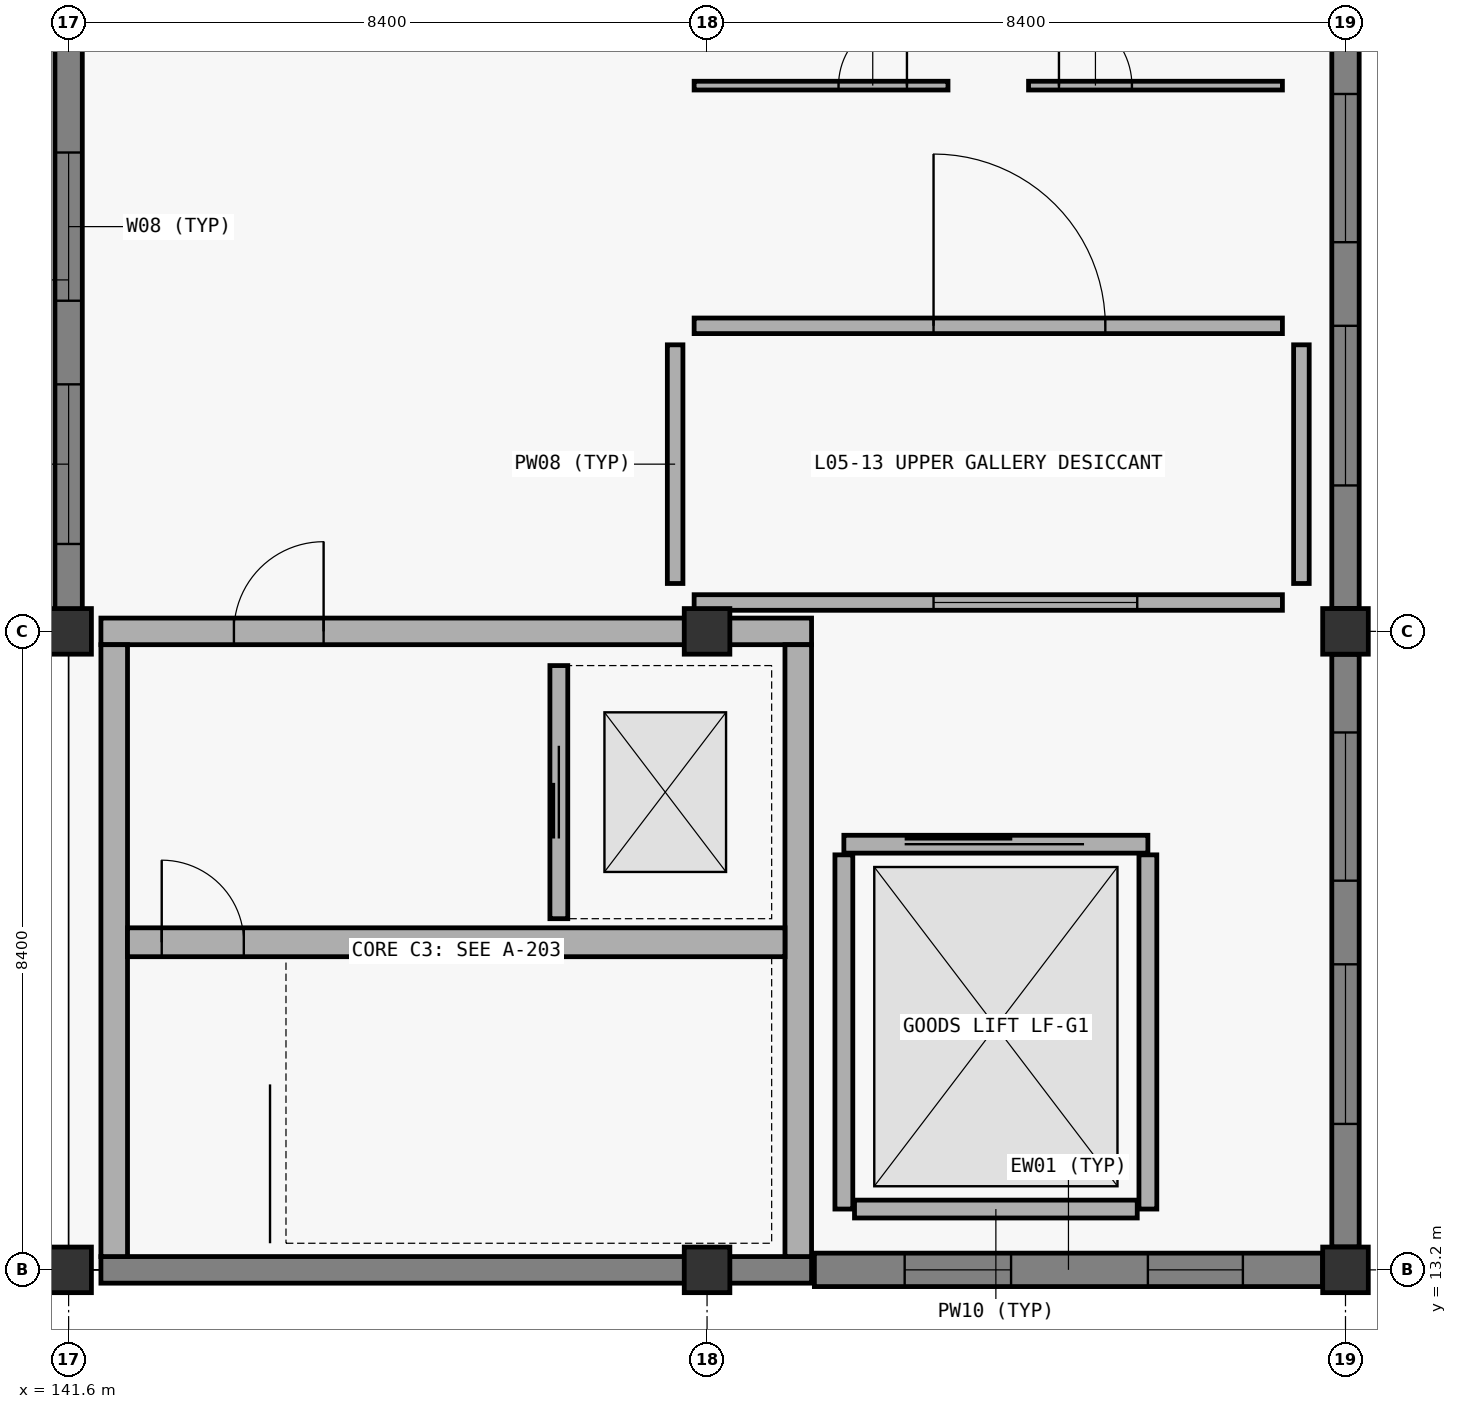
"""IFC4 building model, lengths in metres.
Left out: names, types, materials, properties, quantities, classifications, styles, units other than length and angle.
Written with IfcOpenShell. Run it as: python <this file> out.ifc"""

import sys

from ifc_helpers import new_model, si_unit, direction, frame, frame_2d, origin, origin_2d, place, context, subcontext, project, spatial, rectangle, extrude, element, fill, save


model = new_model("IFC4")
c1 = context("Model", 3, precision=1e-05, world=origin(), true_north=direction((0.0, 1.0)))
c2 = subcontext(c1, "Body", "Model", "MODEL_VIEW")
j1 = project(units=[si_unit("LENGTHUNIT", "METRE"), si_unit("PLANEANGLEUNIT", "RADIAN")], contexts=[c1])
p1 = place(None, origin())
s1 = spatial("IfcSite", under=j1, at=p1, CompositionType="ELEMENT")
p2 = place(p1, origin())
s2 = spatial("IfcBuilding", under=s1, at=p2, CompositionType="ELEMENT")
p3 = place(p2, frame((0.0, 0.0, 26.4)))
s3 = spatial("IfcBuildingStorey", under=s2, at=p3, CompositionType="ELEMENT", Elevation=26.4)
for number, where, z_axis, x_axis in (
    (1, (141.6, 13.2, 0.0), (0.0, 0.0, 1.0), (1.0, 0.0, 0.0)),
    (2, (141.6, 21.6, 0.0), (0.0, 0.0, 1.0), (1.0, 0.0, 0.0)),
    (3, (150.0, 13.2, 0.0), (0.0, 0.0, 1.0), (1.0, 0.0, 0.0)),
    (4, (150.0, 21.6, 0.0), (0.0, 0.0, 1.0), (1.0, 0.0, 0.0)),
    (5, (158.4, 13.2, 0.0), (0.0, 0.0, 1.0), (1.0, 0.0, 0.0)),
    (6, (158.4, 21.6, 0.0), (0.0, 0.0, 1.0), (1.0, 0.0, 0.0)),
):
    element("IfcColumn", number, at=place(p3, frame(where, z_axis=z_axis, x_axis=x_axis)), inside=s3, PredefinedType="COLUMN", context=c2, shape_type="SweptSolid", body=[
        extrude(rectangle(XDim=0.6, YDim=0.6, at=origin_2d()), origin(), (0.0, 0.0, 1.0), 4.5),
    ])
p4 = place(p3, frame((151.375, 13.2, 0.0), z_axis=(0.0, 0.0, 1.0), x_axis=(-1.0, 0.0, 0.0)))
e7 = element("IfcWall", 7, at=p4, inside=s3, PredefinedType="SHEAR", context=c2, shape_type="SweptSolid", body=[
    extrude(rectangle(XDim=9.35, YDim=0.35, at=frame_2d((4.675, 0.0))), origin(), (0.0, 0.0, 1.0), 4.5),
])
p5 = place(p3, frame((142.025, 21.6, 0.0), z_axis=(0.0, 0.0, 1.0), x_axis=(1.0, 0.0, 0.0)))
e8 = element("IfcWall", 8, at=p5, inside=s3, PredefinedType="SHEAR", context=c2, shape_type="SweptSolid", body=[
    extrude(rectangle(XDim=9.35, YDim=0.35, at=frame_2d((4.675, 0.0))), origin(), (0.0, 0.0, 1.0), 4.5),
])
p6 = place(p5, frame((1.75, 0.0, 0.0)))
e9 = element("IfcOpeningElement", 9, at=p6, cuts=e8, PredefinedType="OPENING", context=c2, shape_type="SweptSolid", body=[
    extrude(rectangle(XDim=1.18, YDim=2.24, at=frame_2d((0.59, 1.12))), frame((0.0, 0.185, 0.0), z_axis=(0.0, -1.0, 0.0), x_axis=(1.0, 0.0, 0.0)), (0.0, 0.0, 1.0), 0.37),
])
for number, where, z_axis, x_axis in (
    (10, (142.2, 13.375, 0.0), (0.0, 0.0, 1.0), (0.0, 1.0, 0.0)),
    (11, (151.2, 13.375, 0.0), (0.0, 0.0, 1.0), (0.0, 1.0, 0.0)),
):
    element("IfcWall", number, at=place(p3, frame(where, z_axis=z_axis, x_axis=x_axis)), inside=s3, PredefinedType="SHEAR", context=c2, shape_type="SweptSolid", body=[
        extrude(rectangle(XDim=8.05, YDim=0.35, at=frame_2d((4.025, 0.0))), origin(), (0.0, 0.0, 1.0), 4.5),
    ])
p7 = place(p3, frame((142.375, 17.51, 0.0), z_axis=(0.0, 0.0, 1.0), x_axis=(1.0, 0.0, 0.0)))
e12 = element("IfcWall", 12, at=p7, inside=s3, PredefinedType="SHEAR", context=c2, shape_type="SweptSolid", body=[
    extrude(rectangle(XDim=8.65, YDim=0.38, at=frame_2d((4.325, 0.0))), origin(), (0.0, 0.0, 1.0), 4.5),
])
p8 = place(p7, frame((0.45, 0.0, 0.0)))
e13 = element("IfcOpeningElement", 13, at=p8, cuts=e12, PredefinedType="OPENING", context=c2, shape_type="SweptSolid", body=[
    extrude(rectangle(XDim=1.08, YDim=2.18, at=frame_2d((0.54, 1.09))), frame((0.0, 0.2, 0.0), z_axis=(0.0, -1.0, 0.0), x_axis=(1.0, 0.0, 0.0)), (0.0, 0.0, 1.0), 0.4),
])
p9 = place(p3, frame((151.412, 13.2, 0.0), z_axis=(0.0, 0.0, 1.0), x_axis=(1.0, 0.0, 0.0)))
e14 = element("IfcWall", 14, at=p9, inside=s3, PredefinedType="SOLIDWALL", context=c2, shape_type="SweptSolid", body=[
    extrude(rectangle(XDim=6.686, YDim=0.44, at=frame_2d((3.343, 0.0))), origin(), (0.0, 0.0, 1.0), 3.58),
])
p10 = place(p9, frame((1.188, 0.0, 0.9)))
e15 = element("IfcOpeningElement", 15, at=p10, cuts=e14, PredefinedType="OPENING", context=c2, shape_type="SweptSolid", body=[
    extrude(rectangle(XDim=1.4, YDim=2.2, at=frame_2d((0.7, 1.1))), frame((0.0, 0.23, 0.0), z_axis=(0.0, -1.0, 0.0), x_axis=(1.0, 0.0, 0.0)), (0.0, 0.0, 1.0), 0.46),
])
p11 = place(p9, frame((4.388, 0.0, 0.9)))
e16 = element("IfcOpeningElement", 16, at=p11, cuts=e14, PredefinedType="OPENING", context=c2, shape_type="SweptSolid", body=[
    extrude(rectangle(XDim=1.25, YDim=2.05, at=frame_2d((0.625, 1.025))), frame((0.0, 0.23, 0.0), z_axis=(0.0, -1.0, 0.0), x_axis=(1.0, 0.0, 0.0)), (0.0, 0.0, 1.0), 0.46),
])
p12 = place(p3, frame((158.4, 13.502, 0.0), z_axis=(0.0, 0.0, 1.0), x_axis=(0.0, 1.0, 0.0)))
e17 = element("IfcWall", 17, at=p12, inside=s3, PredefinedType="SOLIDWALL", context=c2, shape_type="SweptSolid", body=[
    extrude(rectangle(XDim=7.796, YDim=0.36, at=frame_2d((3.898, 0.0))), origin(), (0.0, 0.0, 1.0), 3.58),
])
p13 = place(p12, frame((1.618, 0.0, 0.85)))
e18 = element("IfcOpeningElement", 18, at=p13, cuts=e17, PredefinedType="OPENING", context=c2, shape_type="SweptSolid", body=[
    extrude(rectangle(XDim=2.1, YDim=2.4, at=frame_2d((1.05, 1.2))), frame((0.0, 0.19, 0.0), z_axis=(0.0, -1.0, 0.0), x_axis=(1.0, 0.0, 0.0)), (0.0, 0.0, 1.0), 0.38),
])
p14 = place(p12, frame((4.818, 0.0, 0.85)))
e19 = element("IfcOpeningElement", 19, at=p14, cuts=e17, PredefinedType="OPENING", context=c2, shape_type="SweptSolid", body=[
    extrude(rectangle(XDim=1.95, YDim=2.3, at=frame_2d((0.975, 1.15))), frame((0.0, 0.19, 0.0), z_axis=(0.0, -1.0, 0.0), x_axis=(1.0, 0.0, 0.0)), (0.0, 0.0, 1.0), 0.38),
])
p15 = place(p3, frame((158.4, 21.902, 0.0), z_axis=(0.0, 0.0, 1.0), x_axis=(0.0, 1.0, 0.0)))
e20 = element("IfcWall", 20, at=p15, inside=s3, PredefinedType="SOLIDWALL", context=c2, shape_type="SweptSolid", body=[
    extrude(rectangle(XDim=8.996, YDim=0.36, at=frame_2d((4.498, 0.0))), origin(), (0.0, 0.0, 1.0), 3.74),
])
p16 = place(p15, frame((1.618, 0.0, 0.85)))
e21 = element("IfcOpeningElement", 21, at=p16, cuts=e20, PredefinedType="OPENING", context=c2, shape_type="SweptSolid", body=[
    extrude(rectangle(XDim=2.1, YDim=2.4, at=frame_2d((1.05, 1.2))), frame((0.0, 0.19, 0.0), z_axis=(0.0, -1.0, 0.0), x_axis=(1.0, 0.0, 0.0)), (0.0, 0.0, 1.0), 0.38),
])
p17 = place(p15, frame((4.818, 0.0, 0.85)))
e22 = element("IfcOpeningElement", 22, at=p17, cuts=e20, PredefinedType="OPENING", context=c2, shape_type="SweptSolid", body=[
    extrude(rectangle(XDim=1.95, YDim=2.3, at=frame_2d((0.975, 1.15))), frame((0.0, 0.19, 0.0), z_axis=(0.0, -1.0, 0.0), x_axis=(1.0, 0.0, 0.0)), (0.0, 0.0, 1.0), 0.38),
])
p18 = place(p3, frame((141.6, 21.55, 0.0), z_axis=(0.0, 0.0, 1.0), x_axis=(0.0, 1.0, 0.0)))
e23 = element("IfcWall", 23, at=p18, inside=s3, PredefinedType="SOLIDWALL", context=c2, shape_type="SweptSolid", body=[
    extrude(rectangle(XDim=9.348, YDim=0.36, at=frame_2d((4.674, 0.0))), origin(), (0.0, 0.0, 1.0), 3.74),
])
p19 = place(p18, frame((1.2, 0.0, 0.85)))
e24 = element("IfcOpeningElement", 24, at=p19, cuts=e23, PredefinedType="OPENING", context=c2, shape_type="SweptSolid", body=[
    extrude(rectangle(XDim=2.1, YDim=2.4, at=frame_2d((1.05, 1.2))), frame((0.0, 0.19, 0.0), z_axis=(0.0, -1.0, 0.0), x_axis=(1.0, 0.0, 0.0)), (0.0, 0.0, 1.0), 0.38),
])
p20 = place(p18, frame((4.4, 0.0, 0.85)))
e25 = element("IfcOpeningElement", 25, at=p20, cuts=e23, PredefinedType="OPENING", context=c2, shape_type="SweptSolid", body=[
    extrude(rectangle(XDim=1.95, YDim=2.3, at=frame_2d((0.975, 1.15))), frame((0.0, 0.19, 0.0), z_axis=(0.0, -1.0, 0.0), x_axis=(1.0, 0.0, 0.0)), (0.0, 0.0, 1.0), 0.38),
])
p21 = place(p3, frame((148.05, 17.82, 0.0), z_axis=(0.0, 0.0, 1.0), x_axis=(0.0, 1.0, 0.0)))
e26 = element("IfcWall", 26, at=p21, inside=s3, PredefinedType="PARTITIONING", context=c2, shape_type="SweptSolid", body=[
    extrude(rectangle(XDim=3.33, YDim=0.235, at=frame_2d((1.665, 0.0))), origin(), (0.0, 0.0, 1.0), 4.2),
])
p22 = place(p21, frame((1.055, 0.0, 0.0)))
e27 = element("IfcOpeningElement", 27, at=p22, cuts=e26, PredefinedType="OPENING", context=c2, shape_type="SweptSolid", body=[
    extrude(rectangle(XDim=1.22, YDim=2.24, at=frame_2d((0.61, 1.12))), frame((0.0, 0.127, 0.0), z_axis=(0.0, -1.0, 0.0), x_axis=(1.0, 0.0, 0.0)), (0.0, 0.0, 1.0), 0.255),
])
p23 = place(p3, frame((151.8, 18.8, 0.0), z_axis=(0.0, 0.0, 1.0), x_axis=(1.0, 0.0, 0.0)))
e28 = element("IfcWall", 28, at=p23, inside=s3, PredefinedType="PARTITIONING", context=c2, shape_type="SweptSolid", body=[
    extrude(rectangle(XDim=4.0, YDim=0.235, at=frame_2d((2.0, 0.0))), origin(), (0.0, 0.0, 1.0), 3.91),
])
p24 = place(p23, frame((0.8, 0.0, 0.0)))
e29 = element("IfcOpeningElement", 29, at=p24, cuts=e28, PredefinedType="OPENING", context=c2, shape_type="SweptSolid", body=[
    extrude(rectangle(XDim=2.36, YDim=2.78, at=frame_2d((1.18, 1.39))), frame((0.0, 0.127, 0.0), z_axis=(0.0, -1.0, 0.0), x_axis=(1.0, 0.0, 0.0)), (0.0, 0.0, 1.0), 0.255),
])
p25 = place(p3, frame((151.8, 14.0, 0.0), z_axis=(0.0, 0.0, 1.0), x_axis=(0.0, 1.0, 0.0)))
e30 = element("IfcWall", 30, at=p25, inside=s3, PredefinedType="PARTITIONING", context=c2, shape_type="SweptSolid", body=[
    extrude(rectangle(XDim=4.66, YDim=0.235, at=frame_2d((2.33, 0.0))), origin(), (0.0, 0.0, 1.0), 4.2),
])
p26 = place(p3, frame((155.8, 14.0, 0.0), z_axis=(0.0, 0.0, 1.0), x_axis=(0.0, 1.0, 0.0)))
e31 = element("IfcWall", 31, at=p26, inside=s3, PredefinedType="PARTITIONING", context=c2, shape_type="SweptSolid", body=[
    extrude(rectangle(XDim=4.66, YDim=0.235, at=frame_2d((2.33, 0.0))), origin(), (0.0, 0.0, 1.0), 3.91),
])
p27 = place(p3, frame((151.94, 14.0, 0.0), z_axis=(0.0, 0.0, 1.0), x_axis=(1.0, 0.0, 0.0)))
e32 = element("IfcWall", 32, at=p27, inside=s3, PredefinedType="PARTITIONING", context=c2, shape_type="SweptSolid", body=[
    extrude(rectangle(XDim=3.72, YDim=0.235, at=frame_2d((1.86, 0.0))), origin(), (0.0, 0.0, 1.0), 3.91),
])
p28 = place(p3, frame((149.83, 25.62, 0.0), z_axis=(0.0, 0.0, 1.0), x_axis=(1.0, 0.0, 0.0)))
e33 = element("IfcWall", 33, at=p28, inside=s3, PredefinedType="PARTITIONING", context=c2, shape_type="SweptSolid", body=[
    extrude(rectangle(XDim=7.74, YDim=0.205, at=frame_2d((3.87, 0.0))), origin(), (0.0, 0.0, 1.0), 3.73),
])
p29 = place(p28, frame((3.15, 0.0, 0.0)))
e34 = element("IfcOpeningElement", 34, at=p29, cuts=e33, PredefinedType="OPENING", context=c2, shape_type="SweptSolid", body=[
    extrude(rectangle(XDim=2.26, YDim=2.68, at=frame_2d((1.13, 1.34))), frame((0.0, 0.113, 0.0), z_axis=(0.0, -1.0, 0.0), x_axis=(1.0, 0.0, 0.0)), (0.0, 0.0, 1.0), 0.225),
])
p30 = place(p3, frame((149.83, 21.98, 0.0), z_axis=(0.0, 0.0, 1.0), x_axis=(1.0, 0.0, 0.0)))
e35 = element("IfcWall", 35, at=p30, inside=s3, PredefinedType="PARTITIONING", context=c2, shape_type="SweptSolid", body=[
    extrude(rectangle(XDim=7.74, YDim=0.205, at=frame_2d((3.87, 0.0))), origin(), (0.0, 0.0, 1.0), 3.73),
])
p31 = place(p30, frame((3.15, 0.0, 0.9)))
e36 = element("IfcOpeningElement", 36, at=p31, cuts=e35, PredefinedType="OPENING", context=c2, shape_type="SweptSolid", body=[
    extrude(rectangle(XDim=2.68, YDim=1.52, at=frame_2d((1.34, 0.76))), frame((0.0, 0.113, 0.0), z_axis=(0.0, -1.0, 0.0), x_axis=(1.0, 0.0, 0.0)), (0.0, 0.0, 1.0), 0.225),
])
for number, where, z_axis, x_axis in (
    (37, (149.58, 22.23, 0.0), (0.0, 0.0, 1.0), (0.0, 1.0, 0.0)),
    (38, (157.82, 22.23, 0.0), (0.0, 0.0, 1.0), (0.0, 1.0, 0.0)),
):
    element("IfcWall", number, at=place(p3, frame(where, z_axis=z_axis, x_axis=x_axis)), inside=s3, PredefinedType="PARTITIONING", context=c2, shape_type="SweptSolid", body=[
        extrude(rectangle(XDim=3.14, YDim=0.205, at=frame_2d((1.57, 0.0))), origin(), (0.0, 0.0, 1.0), 4.2),
    ])
p32 = place(p3, frame((149.83, 28.78, 0.0), z_axis=(0.0, 0.0, 1.0), x_axis=(1.0, 0.0, 0.0)))
e39 = element("IfcWall", 39, at=p32, inside=s3, PredefinedType="PARTITIONING", context=c2, shape_type="SweptSolid", body=[
    extrude(rectangle(XDim=3.34, YDim=0.115, at=frame_2d((1.67, 0.0))), origin(), (0.0, 0.0, 1.0), 3.73),
])
p33 = place(p32, frame((1.9, 0.0, 0.0)))
e40 = element("IfcOpeningElement", 40, at=p33, cuts=e39, PredefinedType="OPENING", context=c2, shape_type="SweptSolid", body=[
    extrude(rectangle(XDim=0.9, YDim=2.1, at=frame_2d((0.45, 1.05))), frame((0.0, 0.067, 0.0), z_axis=(0.0, -1.0, 0.0), x_axis=(1.0, 0.0, 0.0)), (0.0, 0.0, 1.0), 0.135),
])
p34 = place(p3, frame((154.23, 28.78, 0.0), z_axis=(0.0, 0.0, 1.0), x_axis=(1.0, 0.0, 0.0)))
e41 = element("IfcWall", 41, at=p34, inside=s3, PredefinedType="PARTITIONING", context=c2, shape_type="SweptSolid", body=[
    extrude(rectangle(XDim=3.34, YDim=0.115, at=frame_2d((1.67, 0.0))), origin(), (0.0, 0.0, 1.0), 3.91),
])
p35 = place(p34, frame((0.4, 0.0, 0.0)))
e42 = element("IfcOpeningElement", 42, at=p35, cuts=e41, PredefinedType="OPENING", context=c2, shape_type="SweptSolid", body=[
    extrude(rectangle(XDim=0.96, YDim=2.14, at=frame_2d((0.48, 1.07))), frame((0.0, 0.067, 0.0), z_axis=(0.0, -1.0, 0.0), x_axis=(1.0, 0.0, 0.0)), (0.0, 0.0, 1.0), 0.135),
])
p36 = place(p10, origin())
e43 = element("IfcWindow", 43, at=p36, inside=s3, PartitioningType="SINGLE_PANEL", PredefinedType="WINDOW", context=c2, shape_type="SweptSolid", body=[
    extrude(rectangle(XDim=1.4, YDim=2.2, at=frame_2d((0.7, 1.1))), frame((0.0, 0.03, 0.0), z_axis=(0.0, -1.0, 0.0), x_axis=(1.0, 0.0, 0.0)), (0.0, 0.0, 1.0), 0.06),
])
fill(e15, e43)
p37 = place(p11, origin())
e44 = element("IfcWindow", 44, at=p37, inside=s3, PartitioningType="SINGLE_PANEL", PredefinedType="WINDOW", context=c2, shape_type="SweptSolid", body=[
    extrude(rectangle(XDim=1.25, YDim=2.05, at=frame_2d((0.625, 1.025))), frame((0.0, 0.03, 0.0), z_axis=(0.0, -1.0, 0.0), x_axis=(1.0, 0.0, 0.0)), (0.0, 0.0, 1.0), 0.06),
])
fill(e16, e44)
p38 = place(p13, origin())
e45 = element("IfcWindow", 45, at=p38, inside=s3, PartitioningType="SINGLE_PANEL", PredefinedType="WINDOW", context=c2, shape_type="SweptSolid", body=[
    extrude(rectangle(XDim=2.1, YDim=2.4, at=frame_2d((1.05, 1.2))), frame((0.0, 0.03, 0.0), z_axis=(0.0, -1.0, 0.0), x_axis=(1.0, 0.0, 0.0)), (0.0, 0.0, 1.0), 0.06),
])
fill(e18, e45)
p39 = place(p14, origin())
e46 = element("IfcWindow", 46, at=p39, inside=s3, PartitioningType="SINGLE_PANEL", PredefinedType="WINDOW", context=c2, shape_type="SweptSolid", body=[
    extrude(rectangle(XDim=1.95, YDim=2.3, at=frame_2d((0.975, 1.15))), frame((0.0, 0.03, 0.0), z_axis=(0.0, -1.0, 0.0), x_axis=(1.0, 0.0, 0.0)), (0.0, 0.0, 1.0), 0.06),
])
fill(e19, e46)
p40 = place(p16, origin())
e47 = element("IfcWindow", 47, at=p40, inside=s3, PartitioningType="SINGLE_PANEL", PredefinedType="WINDOW", context=c2, shape_type="SweptSolid", body=[
    extrude(rectangle(XDim=2.1, YDim=2.4, at=frame_2d((1.05, 1.2))), frame((0.0, 0.03, 0.0), z_axis=(0.0, -1.0, 0.0), x_axis=(1.0, 0.0, 0.0)), (0.0, 0.0, 1.0), 0.06),
])
fill(e21, e47)
p41 = place(p17, origin())
e48 = element("IfcWindow", 48, at=p41, inside=s3, PartitioningType="SINGLE_PANEL", PredefinedType="WINDOW", context=c2, shape_type="SweptSolid", body=[
    extrude(rectangle(XDim=1.95, YDim=2.3, at=frame_2d((0.975, 1.15))), frame((0.0, 0.03, 0.0), z_axis=(0.0, -1.0, 0.0), x_axis=(1.0, 0.0, 0.0)), (0.0, 0.0, 1.0), 0.06),
])
fill(e22, e48)
p42 = place(p19, origin())
e49 = element("IfcWindow", 49, at=p42, inside=s3, PartitioningType="SINGLE_PANEL", PredefinedType="WINDOW", context=c2, shape_type="SweptSolid", body=[
    extrude(rectangle(XDim=2.1, YDim=2.4, at=frame_2d((1.05, 1.2))), frame((0.0, 0.03, 0.0), z_axis=(0.0, -1.0, 0.0), x_axis=(1.0, 0.0, 0.0)), (0.0, 0.0, 1.0), 0.06),
])
fill(e24, e49)
p43 = place(p20, origin())
e50 = element("IfcWindow", 50, at=p43, inside=s3, PartitioningType="SINGLE_PANEL", PredefinedType="WINDOW", context=c2, shape_type="SweptSolid", body=[
    extrude(rectangle(XDim=1.95, YDim=2.3, at=frame_2d((0.975, 1.15))), frame((0.0, 0.03, 0.0), z_axis=(0.0, -1.0, 0.0), x_axis=(1.0, 0.0, 0.0)), (0.0, 0.0, 1.0), 0.06),
])
fill(e25, e50)
p44 = place(p8, origin())
e51 = element("IfcDoor", 51, at=p44, inside=s3, OperationType="SINGLE_SWING_LEFT", PredefinedType="DOOR", context=c2, shape_type="SweptSolid", body=[
    extrude(rectangle(XDim=1.08, YDim=2.18, at=frame_2d((0.54, 1.09))), frame((0.0, 0.025, 0.0), z_axis=(0.0, -1.0, 0.0), x_axis=(1.0, 0.0, 0.0)), (0.0, 0.0, 1.0), 0.05),
])
fill(e13, e51)
p45 = place(p6, origin())
e52 = element("IfcDoor", 52, at=p45, inside=s3, OperationType="SINGLE_SWING_RIGHT", PredefinedType="DOOR", context=c2, shape_type="SweptSolid", body=[
    extrude(rectangle(XDim=1.18, YDim=2.24, at=frame_2d((0.59, 1.12))), frame((0.0, 0.025, 0.0), z_axis=(0.0, -1.0, 0.0), x_axis=(1.0, 0.0, 0.0)), (0.0, 0.0, 1.0), 0.05),
])
fill(e9, e52)
p46 = place(p22, origin())
e53 = element("IfcDoor", 53, at=p46, inside=s3, OperationType="SLIDING_TO_RIGHT", PredefinedType="DOOR", context=c2, shape_type="SweptSolid", body=[
    extrude(rectangle(XDim=1.22, YDim=2.24, at=frame_2d((0.61, 1.12))), frame((0.0, 0.025, 0.0), z_axis=(0.0, -1.0, 0.0), x_axis=(1.0, 0.0, 0.0)), (0.0, 0.0, 1.0), 0.05),
])
fill(e27, e53)
p47 = place(p24, origin())
e54 = element("IfcDoor", 54, at=p47, inside=s3, OperationType="SLIDING_TO_LEFT", PredefinedType="DOOR", context=c2, shape_type="SweptSolid", body=[
    extrude(rectangle(XDim=2.36, YDim=2.78, at=frame_2d((1.18, 1.39))), frame((0.0, 0.025, 0.0), z_axis=(0.0, -1.0, 0.0), x_axis=(1.0, 0.0, 0.0)), (0.0, 0.0, 1.0), 0.05),
])
fill(e29, e54)
p48 = place(p29, origin())
e55 = element("IfcDoor", 55, at=p48, inside=s3, OperationType="DOUBLE_SWING_LEFT", PredefinedType="DOOR", context=c2, shape_type="SweptSolid", body=[
    extrude(rectangle(XDim=2.26, YDim=2.68, at=frame_2d((1.13, 1.34))), frame((0.0, 0.025, 0.0), z_axis=(0.0, -1.0, 0.0), x_axis=(1.0, 0.0, 0.0)), (0.0, 0.0, 1.0), 0.05),
])
fill(e34, e55)
p49 = place(p31, origin())
e56 = element("IfcWindow", 56, at=p49, inside=s3, PartitioningType="SINGLE_PANEL", PredefinedType="WINDOW", context=c2, shape_type="SweptSolid", body=[
    extrude(rectangle(XDim=2.68, YDim=1.52, at=frame_2d((1.34, 0.76))), frame((0.0, 0.03, 0.0), z_axis=(0.0, -1.0, 0.0), x_axis=(1.0, 0.0, 0.0)), (0.0, 0.0, 1.0), 0.06),
])
fill(e36, e56)
p50 = place(p33, origin())
e57 = element("IfcDoor", 57, at=p50, inside=s3, OperationType="SINGLE_SWING_RIGHT", PredefinedType="DOOR", context=c2, shape_type="SweptSolid", body=[
    extrude(rectangle(XDim=0.9, YDim=2.1, at=frame_2d((0.45, 1.05))), frame((0.0, 0.025, 0.0), z_axis=(0.0, -1.0, 0.0), x_axis=(1.0, 0.0, 0.0)), (0.0, 0.0, 1.0), 0.05),
])
fill(e40, e57)
p51 = place(p35, origin())
e58 = element("IfcDoor", 58, at=p51, inside=s3, OperationType="SINGLE_SWING_LEFT", PredefinedType="DOOR", context=c2, shape_type="SweptSolid", body=[
    extrude(rectangle(XDim=0.96, YDim=2.14, at=frame_2d((0.48, 1.07))), frame((0.0, 0.025, 0.0), z_axis=(0.0, -1.0, 0.0), x_axis=(1.0, 0.0, 0.0)), (0.0, 0.0, 1.0), 0.05),
])
fill(e42, e58)
save(model, sys.argv[1])
